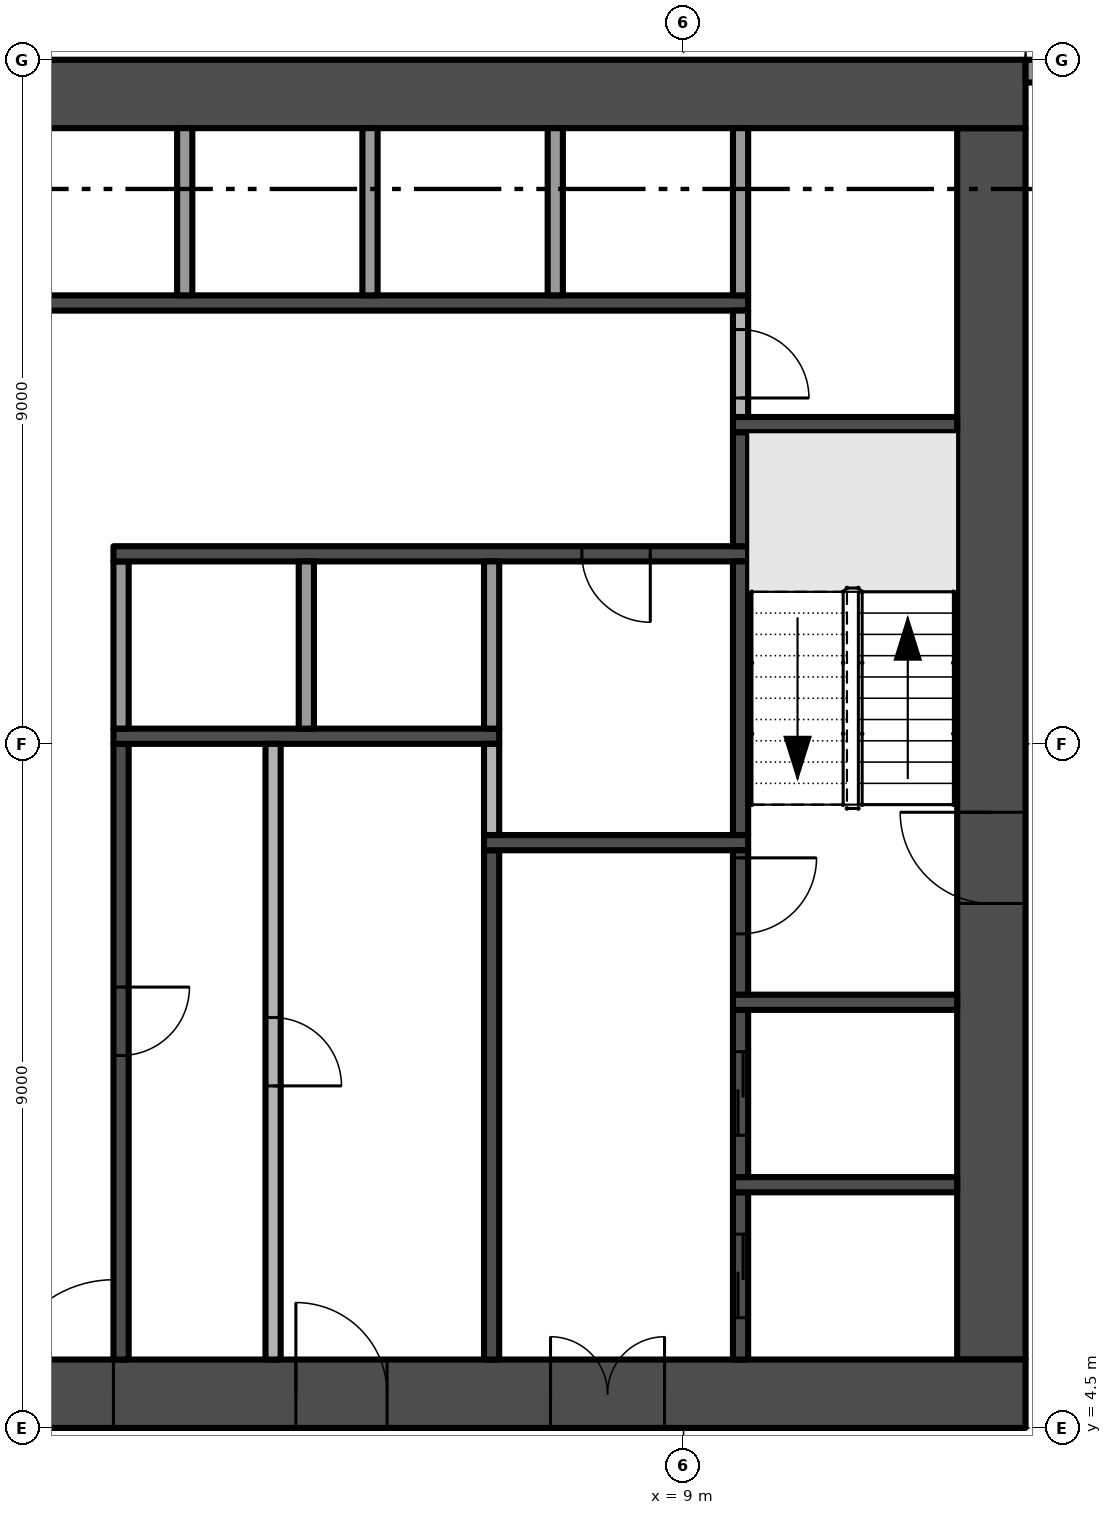
"""IFC4 building model, lengths in metres.
Left out: names, types, materials, properties, quantities, classifications, styles, units other than length and angle.
Written with IfcOpenShell. Run it as: python <this file> out.ifc"""

import sys

from ifc_helpers import new_model, si_unit, direction, frame, frame_2d, origin, place, context, subcontext, project, spatial, rectangle, extrude, element, fill, save


model = new_model("IFC4")
c1 = context("Model", 3, precision=1e-05, world=origin(), true_north=direction((0.0, 1.0)))
c2 = subcontext(c1, "Body", "Model", "MODEL_VIEW")
j1 = project(units=[si_unit("LENGTHUNIT", "METRE"), si_unit("PLANEANGLEUNIT", "RADIAN")], contexts=[c1])
p1 = place(None, origin())
s1 = spatial("IfcSite", under=j1, at=p1, CompositionType="ELEMENT")
p2 = place(p1, origin())
s2 = spatial("IfcBuilding", under=s1, at=p2, CompositionType="ELEMENT")
p3 = place(p2, frame((0.0, 0.0, 53.0)))
s3 = spatial("IfcBuildingStorey", under=s2, at=p3, CompositionType="ELEMENT", Elevation=53.0)
p4 = place(p3, frame((-13.5, 4.95, -0.3), z_axis=(0.0, 0.0, 1.0), x_axis=(1.0, 0.0, 0.0)))
e1 = element("IfcWall", 1, at=p4, inside=s3, PredefinedType="SHEAR", context=c2, shape_type="SweptSolid", body=[
    extrude(rectangle(XDim=27.0, YDim=0.9, at=frame_2d((13.5, 0.0))), origin(), (0.0, 0.0, 1.0), 3.8),
])
p5 = place(p4, frame((12.0, 0.0, 0.3)))
e2 = element("IfcOpeningElement", 2, at=p5, cuts=e1, PredefinedType="OPENING", context=c2, shape_type="SweptSolid", body=[
    extrude(rectangle(XDim=3.0, YDim=2.4, at=frame_2d((1.5, 1.2))), frame((0.0, 0.46, 0.0), z_axis=(0.0, -1.0, 0.0), x_axis=(1.0, 0.0, 0.0)), (0.0, 0.0, 1.0), 0.92),
])
p6 = place(p4, frame((4.9, 0.0, 0.3)))
e3 = element("IfcOpeningElement", 3, at=p6, cuts=e1, PredefinedType="OPENING", context=c2, shape_type="SweptSolid", body=[
    extrude(rectangle(XDim=1.2, YDim=2.2, at=frame_2d((0.6, 1.1))), frame((0.0, 0.46, 0.0), z_axis=(0.0, -1.0, 0.0), x_axis=(1.0, 0.0, 0.0)), (0.0, 0.0, 1.0), 0.92),
])
p7 = place(p4, frame((20.75, 0.0, 0.3)))
e4 = element("IfcOpeningElement", 4, at=p7, cuts=e1, PredefinedType="OPENING", context=c2, shape_type="SweptSolid", body=[
    extrude(rectangle(XDim=1.5, YDim=2.2, at=frame_2d((0.75, 1.1))), frame((0.0, 0.46, 0.0), z_axis=(0.0, -1.0, 0.0), x_axis=(1.0, 0.0, 0.0)), (0.0, 0.0, 1.0), 0.92),
])
p8 = place(p4, frame((17.4, 0.0, 0.3)))
e5 = element("IfcOpeningElement", 5, at=p8, cuts=e1, PredefinedType="OPENING", context=c2, shape_type="SweptSolid", body=[
    extrude(rectangle(XDim=1.2, YDim=2.2, at=frame_2d((0.6, 1.1))), frame((0.0, 0.46, 0.0), z_axis=(0.0, -1.0, 0.0), x_axis=(1.0, 0.0, 0.0)), (0.0, 0.0, 1.0), 0.92),
])
p9 = place(p3, frame((13.05, 5.4, -0.3), z_axis=(0.0, 0.0, 1.0), x_axis=(0.0, 1.0, 0.0)))
e6 = element("IfcWall", 6, at=p9, inside=s3, PredefinedType="SHEAR", context=c2, shape_type="SweptSolid", body=[
    extrude(rectangle(XDim=16.2, YDim=0.9, at=frame_2d((8.1, 0.0))), origin(), (0.0, 0.0, 1.0), 3.8),
])
p10 = place(p9, frame((6.0, 0.0, 0.3)))
e7 = element("IfcOpeningElement", 7, at=p10, cuts=e6, PredefinedType="OPENING", context=c2, shape_type="SweptSolid", body=[
    extrude(rectangle(XDim=1.2, YDim=2.2, at=frame_2d((0.6, 1.1))), frame((0.0, 0.46, 0.0), z_axis=(0.0, -1.0, 0.0), x_axis=(1.0, 0.0, 0.0)), (0.0, 0.0, 1.0), 0.92),
])
p11 = place(p3, frame((13.5, 22.05, -0.3), z_axis=(0.0, 0.0, 1.0), x_axis=(-1.0, 0.0, 0.0)))
e8 = element("IfcWall", 8, at=p11, inside=s3, PredefinedType="SHEAR", context=c2, shape_type="SweptSolid", body=[
    extrude(rectangle(XDim=27.0, YDim=0.9, at=frame_2d((13.5, 0.0))), origin(), (0.0, 0.0, 1.0), 3.8),
])
p12 = place(p3, frame((13.5, 22.35, 0.0), z_axis=(0.0, 0.0, 1.0), x_axis=(1.0, 0.0, 0.0)))
e9 = element("IfcWall", 9, at=p12, inside=s3, PredefinedType="SOLIDWALL", context=c2, shape_type="SweptSolid", body=[
    extrude(rectangle(XDim=3.8, YDim=0.3, at=frame_2d((1.9, 0.0))), origin(), (0.0, 0.0, 1.0), 3.5),
])
p13 = place(p12, frame((0.85, 0.0, 0.45)))
e10 = element("IfcOpeningElement", 10, at=p13, cuts=e9, PredefinedType="OPENING", context=c2, shape_type="SweptSolid", body=[
    extrude(rectangle(XDim=2.65, YDim=2.65, at=frame_2d((1.325, 1.325))), frame((0.0, 0.16, 0.0), z_axis=(0.0, -1.0, 0.0), x_axis=(1.0, 0.0, 0.0)), (0.0, 0.0, 1.0), 0.32),
])
p14 = place(p3, frame((-9.85, 19.3, 0.0), z_axis=(0.0, 0.0, 1.0), x_axis=(1.0, 0.0, 0.0)))
e11 = element("IfcWall", 11, at=p14, inside=s3, PredefinedType="SHEAR", context=c2, shape_type="SweptSolid", body=[
    extrude(rectangle(XDim=19.7, YDim=0.2, at=frame_2d((9.85, 0.0))), origin(), (0.0, 0.0, 1.0), 3.5),
])
p15 = place(p14, frame((0.769, 0.0, 0.0)))
e12 = element("IfcOpeningElement", 12, at=p15, cuts=e11, PredefinedType="OPENING", context=c2, shape_type="SweptSolid", body=[
    extrude(rectangle(XDim=1.1, YDim=2.1, at=frame_2d((0.55, 1.05))), frame((0.0, 0.11, 0.0), z_axis=(0.0, -1.0, 0.0), x_axis=(1.0, 0.0, 0.0)), (0.0, 0.0, 1.0), 0.22),
])
p16 = place(p14, frame((3.206, 0.0, 0.0)))
e13 = element("IfcOpeningElement", 13, at=p16, cuts=e11, PredefinedType="OPENING", context=c2, shape_type="SweptSolid", body=[
    extrude(rectangle(XDim=1.1, YDim=2.1, at=frame_2d((0.55, 1.05))), frame((0.0, 0.11, 0.0), z_axis=(0.0, -1.0, 0.0), x_axis=(1.0, 0.0, 0.0)), (0.0, 0.0, 1.0), 0.22),
])
p17 = place(p14, frame((5.644, 0.0, 0.0)))
e14 = element("IfcOpeningElement", 14, at=p17, cuts=e11, PredefinedType="OPENING", context=c2, shape_type="SweptSolid", body=[
    extrude(rectangle(XDim=1.1, YDim=2.1, at=frame_2d((0.55, 1.05))), frame((0.0, 0.11, 0.0), z_axis=(0.0, -1.0, 0.0), x_axis=(1.0, 0.0, 0.0)), (0.0, 0.0, 1.0), 0.22),
])
p18 = place(p14, frame((8.081, 0.0, 0.0)))
e15 = element("IfcOpeningElement", 15, at=p18, cuts=e11, PredefinedType="OPENING", context=c2, shape_type="SweptSolid", body=[
    extrude(rectangle(XDim=1.1, YDim=2.1, at=frame_2d((0.55, 1.05))), frame((0.0, 0.11, 0.0), z_axis=(0.0, -1.0, 0.0), x_axis=(1.0, 0.0, 0.0)), (0.0, 0.0, 1.0), 0.22),
])
p19 = place(p3, frame((1.6, 13.5, 0.0), z_axis=(0.0, 0.0, 1.0), x_axis=(0.0, -1.0, 0.0)))
e16 = element("IfcWall", 16, at=p19, inside=s3, PredefinedType="SHEAR", context=c2, shape_type="SweptSolid", body=[
    extrude(rectangle(XDim=8.1, YDim=0.2, at=frame_2d((4.05, 0.0))), origin(), (0.0, 0.0, 1.0), 3.5),
])
p20 = place(p19, frame((3.2, 0.0, 0.0)))
e17 = element("IfcOpeningElement", 17, at=p20, cuts=e16, PredefinedType="OPENING", context=c2, shape_type="SweptSolid", body=[
    extrude(rectangle(XDim=0.9, YDim=2.1, at=frame_2d((0.45, 1.05))), frame((0.0, 0.11, 0.0), z_axis=(0.0, -1.0, 0.0), x_axis=(1.0, 0.0, 0.0)), (0.0, 0.0, 1.0), 0.22),
])
p21 = place(p3, frame((1.5, 13.6, 0.0), z_axis=(0.0, 0.0, 1.0), x_axis=(1.0, 0.0, 0.0)))
e18 = element("IfcWall", 18, at=p21, inside=s3, PredefinedType="SHEAR", context=c2, shape_type="SweptSolid", body=[
    extrude(rectangle(XDim=5.075, YDim=0.2, at=frame_2d((2.538, 0.0))), origin(), (0.0, 0.0, 1.0), 3.5),
])
p22 = place(p3, frame((1.6, 13.7, 0.0), z_axis=(0.0, 0.0, 1.0), x_axis=(0.0, 1.0, 0.0)))
e19 = element("IfcWall", 19, at=p22, inside=s3, PredefinedType="PARTITIONING", context=c2, shape_type="SweptSolid", body=[
    extrude(rectangle(XDim=2.2, YDim=0.2, at=frame_2d((1.1, 0.0))), origin(), (0.0, 0.0, 1.0), 3.5),
])
p23 = place(p3, frame((9.85, 16.0, 0.0), z_axis=(0.0, 0.0, 1.0), x_axis=(-1.0, 0.0, 0.0)))
e20 = element("IfcWall", 20, at=p23, inside=s3, PredefinedType="SHEAR", context=c2, shape_type="SweptSolid", body=[
    extrude(rectangle(XDim=8.35, YDim=0.2, at=frame_2d((4.175, 0.0))), origin(), (0.0, 0.0, 1.0), 3.5),
])
p24 = place(p23, frame((1.288, 0.0, 0.0)))
e21 = element("IfcOpeningElement", 21, at=p24, cuts=e20, PredefinedType="OPENING", context=c2, shape_type="SweptSolid", body=[
    extrude(rectangle(XDim=0.9, YDim=2.1, at=frame_2d((0.45, 1.05))), frame((0.0, 0.11, 0.0), z_axis=(0.0, -1.0, 0.0), x_axis=(1.0, 0.0, 0.0)), (0.0, 0.0, 1.0), 0.22),
])
p25 = place(p3, frame((2.438, 19.4, 0.0), z_axis=(0.0, 0.0, 1.0), x_axis=(0.0, 1.0, 0.0)))
e22 = element("IfcWall", 22, at=p25, inside=s3, PredefinedType="PARTITIONING", context=c2, shape_type="SweptSolid", body=[
    extrude(rectangle(XDim=2.2, YDim=0.2, at=frame_2d((1.1, 0.0))), origin(), (0.0, 0.0, 1.0), 3.5),
])
p26 = place(p3, frame((3.6, 13.5, 0.0), z_axis=(0.0, 0.0, 1.0), x_axis=(0.0, -1.0, 0.0)))
e23 = element("IfcWall", 23, at=p26, inside=s3, PredefinedType="PARTITIONING", context=c2, shape_type="SweptSolid", body=[
    extrude(rectangle(XDim=8.1, YDim=0.2, at=frame_2d((4.05, 0.0))), origin(), (0.0, 0.0, 1.0), 3.5),
])
p27 = place(p26, frame((3.6, 0.0, 0.0)))
e24 = element("IfcOpeningElement", 24, at=p27, cuts=e23, PredefinedType="OPENING", context=c2, shape_type="SweptSolid", body=[
    extrude(rectangle(XDim=0.9, YDim=2.1, at=frame_2d((0.45, 1.05))), frame((0.0, 0.11, 0.0), z_axis=(0.0, -1.0, 0.0), x_axis=(1.0, 0.0, 0.0)), (0.0, 0.0, 1.0), 0.22),
])
for number, where, z_axis, x_axis in (
    (25, (4.037, 13.7, 0.0), (0.0, 0.0, 1.0), (0.0, 1.0, 0.0)),
    (26, (4.875, 19.4, 0.0), (0.0, 0.0, 1.0), (0.0, 1.0, 0.0)),
):
    element("IfcWall", number, at=place(p3, frame(where, z_axis=z_axis, x_axis=x_axis)), inside=s3, PredefinedType="PARTITIONING", context=c2, shape_type="SweptSolid", body=[
        extrude(rectangle(XDim=2.2, YDim=0.2, at=frame_2d((1.1, 0.0))), origin(), (0.0, 0.0, 1.0), 3.5),
    ])
p28 = place(p3, frame((6.475, 5.4, 0.0), z_axis=(0.0, 0.0, 1.0), x_axis=(0.0, 1.0, 0.0)))
e27 = element("IfcWall", 27, at=p28, inside=s3, PredefinedType="SHEAR", context=c2, shape_type="SweptSolid", body=[
    extrude(rectangle(XDim=6.7, YDim=0.2, at=frame_2d((3.35, 0.0))), origin(), (0.0, 0.0, 1.0), 3.5),
])
p29 = place(p3, frame((6.375, 12.2, 0.0), z_axis=(0.0, 0.0, 1.0), x_axis=(1.0, 0.0, 0.0)))
e28 = element("IfcWall", 28, at=p29, inside=s3, PredefinedType="SHEAR", context=c2, shape_type="SweptSolid", body=[
    extrude(rectangle(XDim=3.475, YDim=0.2, at=frame_2d((1.738, 0.0))), origin(), (0.0, 0.0, 1.0), 3.5),
])
p30 = place(p3, frame((6.475, 12.3, 0.0), z_axis=(0.0, 0.0, 1.0), x_axis=(0.0, 1.0, 0.0)))
e29 = element("IfcWall", 29, at=p30, inside=s3, PredefinedType="PARTITIONING", context=c2, shape_type="SweptSolid", body=[
    extrude(rectangle(XDim=1.2, YDim=0.2, at=frame_2d((0.6, 0.0))), origin(), (0.0, 0.0, 1.0), 3.5),
])
for number, where, z_axis, x_axis in (
    (30, (6.475, 13.7, 0.0), (0.0, 0.0, 1.0), (0.0, 1.0, 0.0)),
    (31, (7.312, 19.4, 0.0), (0.0, 0.0, 1.0), (0.0, 1.0, 0.0)),
):
    element("IfcWall", number, at=place(p3, frame(where, z_axis=z_axis, x_axis=x_axis)), inside=s3, PredefinedType="PARTITIONING", context=c2, shape_type="SweptSolid", body=[
        extrude(rectangle(XDim=2.2, YDim=0.2, at=frame_2d((1.1, 0.0))), origin(), (0.0, 0.0, 1.0), 3.5),
    ])
p31 = place(p3, frame((9.75, 5.4, 0.0), z_axis=(0.0, 0.0, 1.0), x_axis=(0.0, 1.0, 0.0)))
e32 = element("IfcWall", 32, at=p31, inside=s3, PredefinedType="SHEAR", context=c2, shape_type="SweptSolid", body=[
    extrude(rectangle(XDim=2.2, YDim=0.2, at=frame_2d((1.1, 0.0))), origin(), (0.0, 0.0, 1.0), 3.5),
])
p32 = place(p31, frame((0.55, 0.0, 0.0)))
e33 = element("IfcOpeningElement", 33, at=p32, cuts=e32, PredefinedType="OPENING", context=c2, shape_type="SweptSolid", body=[
    extrude(rectangle(XDim=1.1, YDim=2.1, at=frame_2d((0.55, 1.05))), frame((0.0, 0.11, 0.0), z_axis=(0.0, -1.0, 0.0), x_axis=(1.0, 0.0, 0.0)), (0.0, 0.0, 1.0), 0.22),
])
p33 = place(p3, frame((9.65, 7.7, 0.0), z_axis=(0.0, 0.0, 1.0), x_axis=(1.0, 0.0, 0.0)))
e34 = element("IfcWall", 34, at=p33, inside=s3, PredefinedType="SHEAR", context=c2, shape_type="SweptSolid", body=[
    extrude(rectangle(XDim=2.95, YDim=0.2, at=frame_2d((1.475, 0.0))), origin(), (0.0, 0.0, 1.0), 3.5),
])
p34 = place(p3, frame((9.75, 7.8, 0.0), z_axis=(0.0, 0.0, 1.0), x_axis=(0.0, 1.0, 0.0)))
e35 = element("IfcWall", 35, at=p34, inside=s3, PredefinedType="SHEAR", context=c2, shape_type="SweptSolid", body=[
    extrude(rectangle(XDim=2.2, YDim=0.2, at=frame_2d((1.1, 0.0))), origin(), (0.0, 0.0, 1.0), 3.5),
])
p35 = place(p34, frame((0.55, 0.0, 0.0)))
e36 = element("IfcOpeningElement", 36, at=p35, cuts=e35, PredefinedType="OPENING", context=c2, shape_type="SweptSolid", body=[
    extrude(rectangle(XDim=1.1, YDim=2.1, at=frame_2d((0.55, 1.05))), frame((0.0, 0.11, 0.0), z_axis=(0.0, -1.0, 0.0), x_axis=(1.0, 0.0, 0.0)), (0.0, 0.0, 1.0), 0.22),
])
p36 = place(p3, frame((9.65, 10.1, 0.0), z_axis=(0.0, 0.0, 1.0), x_axis=(1.0, 0.0, 0.0)))
e37 = element("IfcWall", 37, at=p36, inside=s3, PredefinedType="SHEAR", context=c2, shape_type="SweptSolid", body=[
    extrude(rectangle(XDim=2.95, YDim=0.2, at=frame_2d((1.475, 0.0))), origin(), (0.0, 0.0, 1.0), 3.5),
])
p37 = place(p3, frame((9.75, 12.1, 0.0), z_axis=(0.0, 0.0, 1.0), x_axis=(0.0, -1.0, 0.0)))
e38 = element("IfcWall", 38, at=p37, inside=s3, PredefinedType="SHEAR", context=c2, shape_type="SweptSolid", body=[
    extrude(rectangle(XDim=1.9, YDim=0.2, at=frame_2d((0.95, 0.0))), origin(), (0.0, 0.0, 1.0), 3.5),
])
p38 = place(p37, frame((0.1, 0.0, 0.0)))
e39 = element("IfcOpeningElement", 39, at=p38, cuts=e38, PredefinedType="OPENING", context=c2, shape_type="SweptSolid", body=[
    extrude(rectangle(XDim=1.0, YDim=2.2, at=frame_2d((0.5, 1.1))), frame((0.0, 0.11, 0.0), z_axis=(0.0, -1.0, 0.0), x_axis=(1.0, 0.0, 0.0)), (0.0, 0.0, 1.0), 0.22),
])
p39 = place(p3, frame((9.75, 12.3, 0.0), z_axis=(0.0, 0.0, 1.0), x_axis=(0.0, 1.0, 0.0)))
e40 = element("IfcWall", 40, at=p39, inside=s3, PredefinedType="SHEAR", context=c2, shape_type="SweptSolid", body=[
    extrude(rectangle(XDim=3.6, YDim=0.2, at=frame_2d((1.8, 0.0))), origin(), (0.0, 0.0, 1.0), 3.5),
])
p40 = place(p3, frame((9.75, 16.1, 0.0), z_axis=(0.0, 0.0, 1.0), x_axis=(0.0, 1.0, 0.0)))
e41 = element("IfcWall", 41, at=p40, inside=s3, PredefinedType="SHEAR", context=c2, shape_type="SweptSolid", body=[
    extrude(rectangle(XDim=1.5, YDim=0.2, at=frame_2d((0.75, 0.0))), origin(), (0.0, 0.0, 1.0), 3.5),
])
p41 = place(p3, frame((9.65, 17.7, 0.0), z_axis=(0.0, 0.0, 1.0), x_axis=(1.0, 0.0, 0.0)))
e42 = element("IfcWall", 42, at=p41, inside=s3, PredefinedType="SHEAR", context=c2, shape_type="SweptSolid", body=[
    extrude(rectangle(XDim=2.95, YDim=0.2, at=frame_2d((1.475, 0.0))), origin(), (0.0, 0.0, 1.0), 3.5),
])
p42 = place(p3, frame((9.75, 19.2, 0.0), z_axis=(0.0, 0.0, 1.0), x_axis=(0.0, -1.0, 0.0)))
e43 = element("IfcWall", 43, at=p42, inside=s3, PredefinedType="PARTITIONING", context=c2, shape_type="SweptSolid", body=[
    extrude(rectangle(XDim=1.4, YDim=0.2, at=frame_2d((0.7, 0.0))), origin(), (0.0, 0.0, 1.0), 3.5),
])
p43 = place(p42, frame((0.25, 0.0, 0.0)))
e44 = element("IfcOpeningElement", 44, at=p43, cuts=e43, PredefinedType="OPENING", context=c2, shape_type="SweptSolid", body=[
    extrude(rectangle(XDim=0.9, YDim=2.1, at=frame_2d((0.45, 1.05))), frame((0.0, 0.11, 0.0), z_axis=(0.0, -1.0, 0.0), x_axis=(1.0, 0.0, 0.0)), (0.0, 0.0, 1.0), 0.22),
])
p44 = place(p3, frame((9.75, 19.4, 0.0), z_axis=(0.0, 0.0, 1.0), x_axis=(0.0, 1.0, 0.0)))
e45 = element("IfcWall", 45, at=p44, inside=s3, PredefinedType="PARTITIONING", context=c2, shape_type="SweptSolid", body=[
    extrude(rectangle(XDim=2.2, YDim=0.2, at=frame_2d((1.1, 0.0))), origin(), (0.0, 0.0, 1.0), 3.5),
])
p45 = place(p5, frame((3.0, 0.0, 0.0), z_axis=(0.0, 0.0, 1.0), x_axis=(-1.0, 0.0, 0.0)))
e46 = element("IfcDoor", 46, at=p45, inside=s3, OperationType="DOUBLE_DOOR_SINGLE_SWING", PredefinedType="DOOR", context=c2, shape_type="SweptSolid", body=[
    extrude(rectangle(XDim=3.0, YDim=2.4, at=frame_2d((1.5, 1.2))), frame((0.0, 0.025, 0.0), z_axis=(0.0, -1.0, 0.0), x_axis=(1.0, 0.0, 0.0)), (0.0, 0.0, 1.0), 0.05),
])
fill(e2, e46)
p46 = place(p10, frame((1.2, 0.0, 0.0), z_axis=(0.0, 0.0, 1.0), x_axis=(-1.0, 0.0, 0.0)))
e47 = element("IfcDoor", 47, at=p46, inside=s3, OperationType="SINGLE_SWING_LEFT", PredefinedType="DOOR", context=c2, shape_type="SweptSolid", body=[
    extrude(rectangle(XDim=1.2, YDim=2.2, at=frame_2d((0.6, 1.1))), frame((0.0, 0.025, 0.0), z_axis=(0.0, -1.0, 0.0), x_axis=(1.0, 0.0, 0.0)), (0.0, 0.0, 1.0), 0.05),
])
fill(e7, e47)
p47 = place(p7, frame((1.5, 0.0, 0.0), z_axis=(0.0, 0.0, 1.0), x_axis=(-1.0, 0.0, 0.0)))
e48 = element("IfcDoor", 48, at=p47, inside=s3, OperationType="DOUBLE_DOOR_SINGLE_SWING", PredefinedType="DOOR", context=c2, shape_type="SweptSolid", body=[
    extrude(rectangle(XDim=1.5, YDim=2.2, at=frame_2d((0.75, 1.1))), frame((0.0, 0.025, 0.0), z_axis=(0.0, -1.0, 0.0), x_axis=(1.0, 0.0, 0.0)), (0.0, 0.0, 1.0), 0.05),
])
fill(e4, e48)
p48 = place(p8, frame((1.2, 0.0, 0.0), z_axis=(0.0, 0.0, 1.0), x_axis=(-1.0, 0.0, 0.0)))
e49 = element("IfcDoor", 49, at=p48, inside=s3, OperationType="SINGLE_SWING_RIGHT", PredefinedType="DOOR", context=c2, shape_type="SweptSolid", body=[
    extrude(rectangle(XDim=1.2, YDim=2.2, at=frame_2d((0.6, 1.1))), frame((0.0, 0.025, 0.0), z_axis=(0.0, -1.0, 0.0), x_axis=(1.0, 0.0, 0.0)), (0.0, 0.0, 1.0), 0.05),
])
fill(e5, e49)
p49 = place(p38, origin())
e50 = element("IfcDoor", 50, at=p49, inside=s3, OperationType="SINGLE_SWING_LEFT", PredefinedType="DOOR", context=c2, shape_type="SweptSolid", body=[
    extrude(rectangle(XDim=1.0, YDim=2.2, at=frame_2d((0.5, 1.1))), frame((0.0, 0.025, 0.0), z_axis=(0.0, -1.0, 0.0), x_axis=(1.0, 0.0, 0.0)), (0.0, 0.0, 1.0), 0.05),
])
fill(e39, e50)
p50 = place(p32, origin())
e51 = element("IfcDoor", 51, at=p50, inside=s3, OperationType="SLIDING_TO_RIGHT", PredefinedType="DOOR", context=c2, shape_type="SweptSolid", body=[
    extrude(rectangle(XDim=1.1, YDim=2.1, at=frame_2d((0.55, 1.05))), frame((0.0, 0.025, 0.0), z_axis=(0.0, -1.0, 0.0), x_axis=(1.0, 0.0, 0.0)), (0.0, 0.0, 1.0), 0.05),
])
fill(e33, e51)
p51 = place(p35, origin())
e52 = element("IfcDoor", 52, at=p51, inside=s3, OperationType="SLIDING_TO_RIGHT", PredefinedType="DOOR", context=c2, shape_type="SweptSolid", body=[
    extrude(rectangle(XDim=1.1, YDim=2.1, at=frame_2d((0.55, 1.05))), frame((0.0, 0.025, 0.0), z_axis=(0.0, -1.0, 0.0), x_axis=(1.0, 0.0, 0.0)), (0.0, 0.0, 1.0), 0.05),
])
fill(e36, e52)
p52 = place(p20, origin())
e53 = element("IfcDoor", 53, at=p52, inside=s3, OperationType="SINGLE_SWING_LEFT", PredefinedType="DOOR", context=c2, shape_type="SweptSolid", body=[
    extrude(rectangle(XDim=0.9, YDim=2.1, at=frame_2d((0.45, 1.05))), frame((0.0, 0.025, 0.0), z_axis=(0.0, -1.0, 0.0), x_axis=(1.0, 0.0, 0.0)), (0.0, 0.0, 1.0), 0.05),
])
fill(e17, e53)
p53 = place(p24, origin())
e54 = element("IfcDoor", 54, at=p53, inside=s3, OperationType="SINGLE_SWING_LEFT", PredefinedType="DOOR", context=c2, shape_type="SweptSolid", body=[
    extrude(rectangle(XDim=0.9, YDim=2.1, at=frame_2d((0.45, 1.05))), frame((0.0, 0.025, 0.0), z_axis=(0.0, -1.0, 0.0), x_axis=(1.0, 0.0, 0.0)), (0.0, 0.0, 1.0), 0.05),
])
fill(e21, e54)
p54 = place(p43, origin())
e55 = element("IfcDoor", 55, at=p54, inside=s3, OperationType="SINGLE_SWING_RIGHT", PredefinedType="DOOR", context=c2, shape_type="SweptSolid", body=[
    extrude(rectangle(XDim=0.9, YDim=2.1, at=frame_2d((0.45, 1.05))), frame((0.0, 0.025, 0.0), z_axis=(0.0, -1.0, 0.0), x_axis=(1.0, 0.0, 0.0)), (0.0, 0.0, 1.0), 0.05),
])
fill(e44, e55)
p55 = place(p27, origin())
e56 = element("IfcDoor", 56, at=p55, inside=s3, OperationType="SINGLE_SWING_RIGHT", PredefinedType="DOOR", context=c2, shape_type="SweptSolid", body=[
    extrude(rectangle(XDim=0.9, YDim=2.1, at=frame_2d((0.45, 1.05))), frame((0.0, 0.025, 0.0), z_axis=(0.0, -1.0, 0.0), x_axis=(1.0, 0.0, 0.0)), (0.0, 0.0, 1.0), 0.05),
])
fill(e24, e56)
save(model, sys.argv[1])
